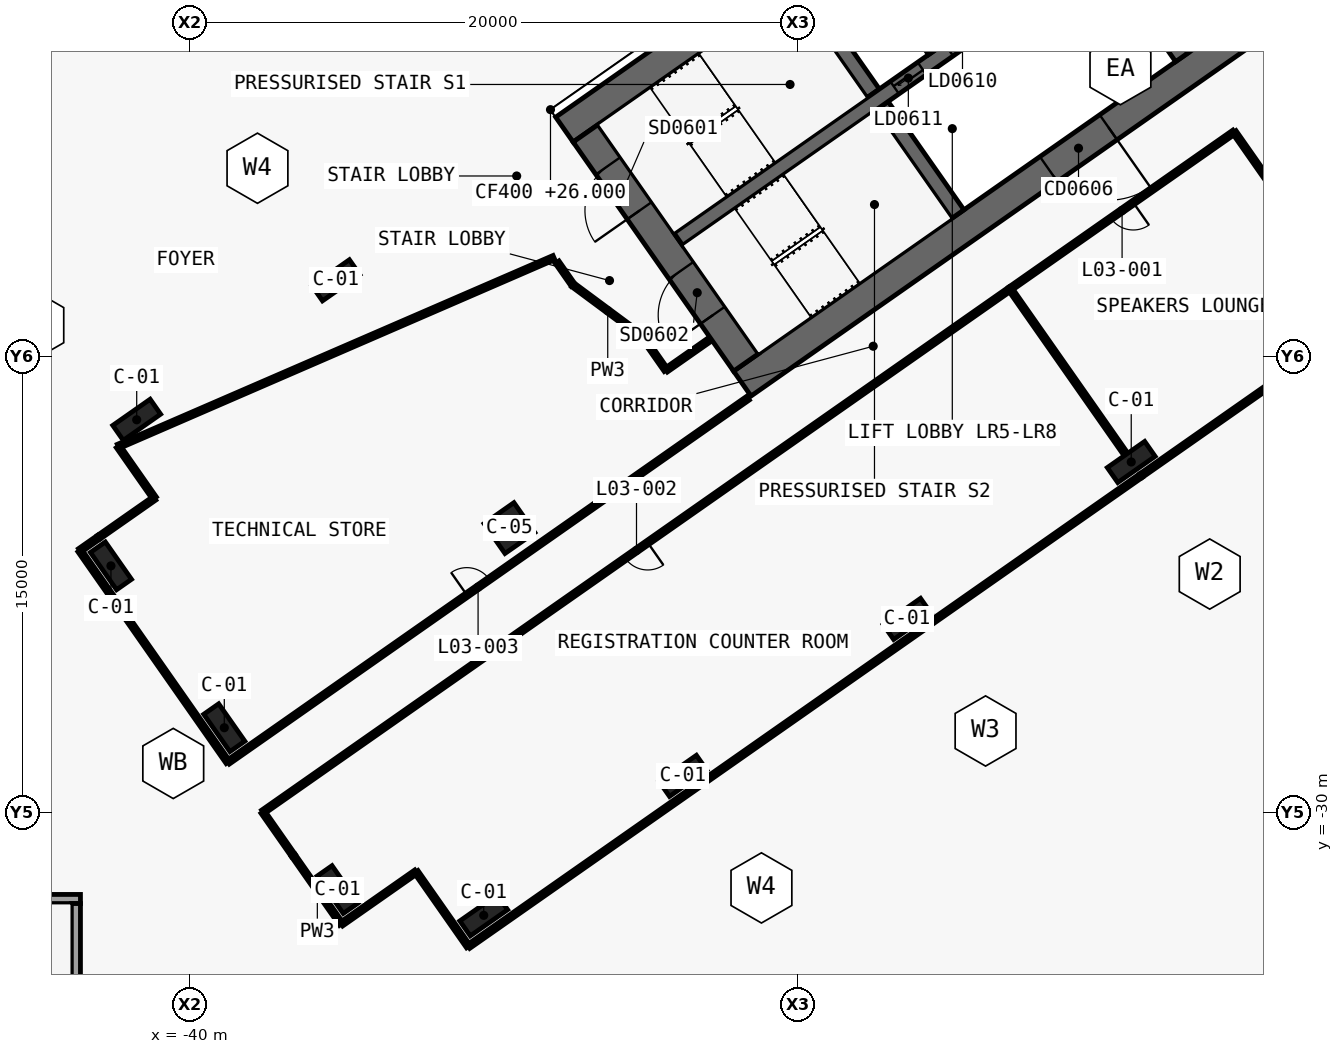
"""IFC4 building model, lengths in metres.
Left out: names, types, materials, properties, quantities, classifications, styles, units other than length and angle.
Written with IfcOpenShell. Run it as: python <this file> out.ifc"""

import sys

from ifc_helpers import new_model, si_unit, direction, frame, frame_2d, origin, origin_2d, place, context, subcontext, project, spatial, polyline, rectangle, outline, extrude, element, fill, save


model = new_model("IFC4")
c1 = context("Model", 3, precision=1e-05, world=origin(), true_north=direction((0.0, 1.0)))
c2 = subcontext(c1, "Body", "Model", "MODEL_VIEW")
j1 = project(units=[si_unit("LENGTHUNIT", "METRE"), si_unit("PLANEANGLEUNIT", "RADIAN")], contexts=[c1])
p1 = place(None, origin())
s1 = spatial("IfcSite", under=j1, at=p1, CompositionType="ELEMENT")
p2 = place(p1, origin())
s2 = spatial("IfcBuilding", under=s1, at=p2, CompositionType="ELEMENT")
p3 = place(p2, frame((0.0, 0.0, 26.0)))
s3 = spatial("IfcBuildingStorey", under=s2, at=p3, CompositionType="ELEMENT", Elevation=26.0)
p4 = place(p3, frame((0.037, 11.867, 0.0), z_axis=(0.0, 0.0, 1.0), x_axis=(-0.819155306259, -0.573571777746, 0.0)))
e1 = element("IfcWall", 1, at=p4, inside=s3, PredefinedType="SHEAR", context=c2, shape_type="SweptSolid", body=[
    extrude(outline(polyline([(33.837, 0.5), (0.7, 0.5), (0.0, -0.5), (33.837, -0.5), (33.837, 0.5)])), origin(), (0.0, 0.0, 1.0), 6.0),
])
p5 = place(p3, frame((0.037, -0.585, 0.0), z_axis=(0.0, 0.0, 1.0), x_axis=(-0.819157152511, -0.573569140985, 0.0)))
e2 = element("IfcWall", 2, at=p5, inside=s3, PredefinedType="SHEAR", context=c2, shape_type="SweptSolid", body=[
    extrude(outline(polyline([(26.695, 0.5), (0.7, 0.5), (0.0, -0.5), (26.695, -0.5), (26.695, 0.5)])), origin(), (0.0, 0.0, 1.0), 6.0),
])
p6 = place(p5, frame((2.995, 0.0, 0.0)))
e3 = element("IfcOpeningElement", 3, at=p6, cuts=e2, PredefinedType="OPENING", context=c2, shape_type="SweptSolid", body=[
    extrude(rectangle(XDim=2.4, YDim=2.1, at=frame_2d((1.2, 1.05))), frame((0.0, 0.51, 0.0), z_axis=(0.0, -1.0, 0.0), x_axis=(1.0, 0.0, 0.0)), (0.0, 0.0, 1.0), 1.02),
])
p7 = place(p5, frame((11.995, 0.0, 0.0)))
e4 = element("IfcOpeningElement", 4, at=p7, cuts=e2, PredefinedType="OPENING", context=c2, shape_type="SweptSolid", body=[
    extrude(rectangle(XDim=2.4, YDim=2.1, at=frame_2d((1.2, 1.05))), frame((0.0, 0.51, 0.0), z_axis=(0.0, -1.0, 0.0), x_axis=(1.0, 0.0, 0.0)), (0.0, 0.0, 1.0), 1.02),
])
p8 = place(p3, frame((-21.708, -15.2, 0.0), z_axis=(0.0, 0.0, 1.0), x_axis=(-0.573576324356, 0.819152122709, 0.0)))
e5 = element("IfcWall", 5, at=p8, inside=s3, PredefinedType="SHEAR", context=c2, shape_type="SweptSolid", body=[
    extrude(outline(polyline([(0.0, 0.5), (0.0, -0.5), (9.2, -0.5), (9.2, 0.5), (0.0, 0.5)])), origin(), (0.0, 0.0, 1.0), 6.0),
])
p9 = place(p8, frame((6.1, 0.0, 0.0)))
e6 = element("IfcOpeningElement", 6, at=p9, cuts=e5, PredefinedType="OPENING", context=c2, shape_type="SweptSolid", body=[
    extrude(rectangle(XDim=1.8, YDim=2.1, at=frame_2d((0.9, 1.05))), frame((0.0, 0.51, 0.0), z_axis=(0.0, -1.0, 0.0), x_axis=(1.0, 0.0, 0.0)), (0.0, 0.0, 1.0), 1.02),
])
p10 = place(p8, frame((1.9, 0.0, 0.0)))
e7 = element("IfcOpeningElement", 7, at=p10, cuts=e5, PredefinedType="OPENING", context=c2, shape_type="SweptSolid", body=[
    extrude(rectangle(XDim=1.8, YDim=2.1, at=frame_2d((0.9, 1.05))), frame((0.0, 0.51, 0.0), z_axis=(0.0, -1.0, 0.0), x_axis=(1.0, 0.0, 0.0)), (0.0, 0.0, 1.0), 1.02),
])
p11 = place(p3, frame((-7.372, -5.162, 0.0), z_axis=(0.0, 0.0, 1.0), x_axis=(-0.573594173421, 0.819139624372, 0.0)))
e8 = element("IfcWall", 8, at=p11, inside=s3, PredefinedType="SHEAR", context=c2, shape_type="SweptSolid", body=[
    extrude(outline(polyline([(4.35, 0.25), (0.0, 0.25), (0.0, -0.25), (4.35, -0.25), (4.35, 0.25)])), origin(), (0.0, 0.0, 1.0), 6.0),
])
p12 = place(p3, frame((-14.745, -10.324, 0.0), z_axis=(0.0, 0.0, 1.0), x_axis=(-0.57356780395, 0.819158088694, 0.0)))
e9 = element("IfcWall", 9, at=p12, inside=s3, PredefinedType="SHEAR", context=c2, shape_type="SweptSolid", body=[
    extrude(outline(polyline([(4.35, 0.25), (0.0, 0.25), (0.0, -0.25), (4.35, -0.25), (4.35, 0.25)])), origin(), (0.0, 0.0, 1.0), 6.0),
])
p13 = place(p3, frame((-17.527, -6.352, 0.0), z_axis=(0.0, 0.0, 1.0), x_axis=(-0.573530143085, 0.819184457233, 0.0)))
e10 = element("IfcWall", 10, at=p13, inside=s3, PredefinedType="SHEAR", context=c2, shape_type="SweptSolid", body=[
    extrude(outline(polyline([(4.35, -0.25), (4.35, 0.25), (0.0, 0.25), (0.0, -0.25), (4.35, -0.25)])), origin(), (0.0, 0.0, 1.0), 6.0),
])
p14 = place(p3, frame((-2.638, 3.768, 0.0), z_axis=(0.0, 0.0, 1.0), x_axis=(-0.819148977158, -0.573580816643, 0.0)))
e11 = element("IfcWall", 11, at=p14, inside=s3, PredefinedType="SHEAR", context=c2, shape_type="SweptSolid", body=[
    extrude(outline(polyline([(26.0, 0.25), (0.0, 0.25), (0.0, -0.25), (26.0, -0.25), (26.0, 0.25)])), origin(), (0.0, 0.0, 1.0), 6.0),
])
p15 = place(p14, frame((1.169, 0.0, 0.0)))
e12 = element("IfcOpeningElement", 12, at=p15, cuts=e11, PredefinedType="OPENING", context=c2, shape_type="SweptSolid", body=[
    extrude(rectangle(XDim=1.1, YDim=2.1, at=frame_2d((0.55, 1.05))), frame((0.0, 0.26, 0.0), z_axis=(0.0, -1.0, 0.0), x_axis=(1.0, 0.0, 0.0)), (0.0, 0.0, 1.0), 0.52),
])
p16 = place(p14, frame((3.206, 0.0, 0.0)))
e13 = element("IfcOpeningElement", 13, at=p16, cuts=e11, PredefinedType="OPENING", context=c2, shape_type="SweptSolid", body=[
    extrude(rectangle(XDim=1.1, YDim=2.1, at=frame_2d((0.55, 1.05))), frame((0.0, 0.26, 0.0), z_axis=(0.0, -1.0, 0.0), x_axis=(1.0, 0.0, 0.0)), (0.0, 0.0, 1.0), 0.52),
])
p17 = place(p14, frame((5.244, 0.0, 0.0)))
e14 = element("IfcOpeningElement", 14, at=p17, cuts=e11, PredefinedType="OPENING", context=c2, shape_type="SweptSolid", body=[
    extrude(rectangle(XDim=1.1, YDim=2.1, at=frame_2d((0.55, 1.05))), frame((0.0, 0.26, 0.0), z_axis=(0.0, -1.0, 0.0), x_axis=(1.0, 0.0, 0.0)), (0.0, 0.0, 1.0), 0.52),
])
p18 = place(p14, frame((7.281, 0.0, 0.0)))
e15 = element("IfcOpeningElement", 15, at=p18, cuts=e11, PredefinedType="OPENING", context=c2, shape_type="SweptSolid", body=[
    extrude(rectangle(XDim=1.1, YDim=2.1, at=frame_2d((0.55, 1.05))), frame((0.0, 0.26, 0.0), z_axis=(0.0, -1.0, 0.0), x_axis=(1.0, 0.0, 0.0)), (0.0, 0.0, 1.0), 0.52),
])
p19 = place(p14, frame((9.688, 0.0, 0.0)))
e16 = element("IfcOpeningElement", 16, at=p19, cuts=e11, PredefinedType="OPENING", context=c2, shape_type="SweptSolid", body=[
    extrude(rectangle(XDim=1.1, YDim=2.1, at=frame_2d((0.55, 1.05))), frame((0.0, 0.26, 0.0), z_axis=(0.0, -1.0, 0.0), x_axis=(1.0, 0.0, 0.0)), (0.0, 0.0, 1.0), 0.52),
])
p20 = place(p14, frame((11.863, 0.0, 0.0)))
e17 = element("IfcOpeningElement", 17, at=p20, cuts=e11, PredefinedType="OPENING", context=c2, shape_type="SweptSolid", body=[
    extrude(rectangle(XDim=1.1, YDim=2.1, at=frame_2d((0.55, 1.05))), frame((0.0, 0.26, 0.0), z_axis=(0.0, -1.0, 0.0), x_axis=(1.0, 0.0, 0.0)), (0.0, 0.0, 1.0), 0.52),
])
p21 = place(p14, frame((14.038, 0.0, 0.0)))
e18 = element("IfcOpeningElement", 18, at=p21, cuts=e11, PredefinedType="OPENING", context=c2, shape_type="SweptSolid", body=[
    extrude(rectangle(XDim=1.1, YDim=2.1, at=frame_2d((0.55, 1.05))), frame((0.0, 0.26, 0.0), z_axis=(0.0, -1.0, 0.0), x_axis=(1.0, 0.0, 0.0)), (0.0, 0.0, 1.0), 0.52),
])
p22 = place(p14, frame((16.212, 0.0, 0.0)))
e19 = element("IfcOpeningElement", 19, at=p22, cuts=e11, PredefinedType="OPENING", context=c2, shape_type="SweptSolid", body=[
    extrude(rectangle(XDim=1.1, YDim=2.1, at=frame_2d((0.55, 1.05))), frame((0.0, 0.26, 0.0), z_axis=(0.0, -1.0, 0.0), x_axis=(1.0, 0.0, 0.0)), (0.0, 0.0, 1.0), 0.52),
])
p23 = place(p3, frame((-49.4, -32.85, 0.0), z_axis=(0.0, 0.0, 1.0), x_axis=(1.0, 0.0, 0.0)))
e20 = element("IfcWall", 20, at=p23, inside=s3, PredefinedType="SOLIDWALL", context=c2, shape_type="SweptSolid", body=[
    extrude(rectangle(XDim=5.8, YDim=0.3, at=frame_2d((2.9, 0.0))), origin(), (0.0, 0.0, 1.0), 6.0),
])
p24 = place(p3, frame((-43.75, -43.0, 0.0), z_axis=(0.0, 0.0, 1.0), x_axis=(0.0, 1.0, 0.0)))
e21 = element("IfcWall", 21, at=p24, inside=s3, PredefinedType="SOLIDWALL", context=c2, shape_type="SweptSolid", body=[
    extrude(rectangle(XDim=10.0, YDim=0.3, at=frame_2d((5.0, 0.0))), origin(), (0.0, 0.0, 1.0), 6.0),
])
p25 = place(p24, frame((0.212, 0.0, 0.0)))
e22 = element("IfcOpeningElement", 22, at=p25, cuts=e21, PredefinedType="OPENING", context=c2, shape_type="SweptSolid", body=[
    extrude(rectangle(XDim=2.1, YDim=2.1, at=frame_2d((1.05, 1.05))), frame((0.0, 0.16, 0.0), z_axis=(0.0, -1.0, 0.0), x_axis=(1.0, 0.0, 0.0)), (0.0, 0.0, 1.0), 0.32),
])
for number, where, z_axis, x_axis in (
    (23, (-9.038, -18.475, 0.0), (0.0, 0.0, 1.0), (-0.819, -0.574, 0.0)),
    (24, (-16.41, -23.637, 0.0), (0.0, 0.0, 1.0), (-0.819, -0.574, 0.0)),
    (25, (-23.782, -28.799, 0.0), (0.0, 0.0, 1.0), (-0.819, -0.574, 0.0)),
    (26, (-30.336, -33.388, 0.0), (0.0, 0.0, 1.0), (-0.819, -0.574, 0.0)),
    (27, (-35.197, -12.498, 0.0), (0.0, 0.0, 1.0), (-0.819, -0.574, 0.0)),
    (28, (-41.75, -17.087, 0.0), (0.0, 0.0, 1.0), (-0.819, -0.574, 0.0)),
    (29, (-35.14, -32.541, 0.0), (0.0, 0.0, 1.0), (-0.574, 0.819, 0.0)),
    (30, (-38.869, -27.216, 0.0), (0.0, 0.0, 1.0), (-0.574, 0.819, 0.0)),
    (31, (-42.597, -21.892, 0.0), (0.0, 0.0, 1.0), (-0.574, 0.819, 0.0)),
):
    element("IfcColumn", number, at=place(p3, frame(where, z_axis=z_axis, x_axis=x_axis)), inside=s3, PredefinedType="COLUMN", context=c2, shape_type="SweptSolid", body=[
        extrude(rectangle(XDim=1.5, YDim=0.6, at=origin_2d()), origin(), (0.0, 0.0, 1.0), 6.0),
    ])
p26 = place(p3, frame((-29.49, -20.649, 0.0), z_axis=(0.0, 0.0, 1.0), x_axis=(-0.819152044289, -0.573576436351, 0.0)))
e32 = element("IfcColumn", 32, at=p26, inside=s3, PredefinedType="COLUMN", context=c2, shape_type="SweptSolid", body=[
    extrude(rectangle(XDim=1.2, YDim=1.2, at=origin_2d()), origin(), (0.0, 0.0, 1.0), 6.0),
])
p27 = place(p3, frame((-15.622, -5.018, 0.0), z_axis=(0.0, 0.0, 1.0), x_axis=(-0.573594173421, 0.819139624372, 0.0)))
e33 = element("IfcWall", 33, at=p27, inside=s3, PredefinedType="SOLIDWALL", context=c2, shape_type="SweptSolid", body=[
    extrude(rectangle(XDim=4.35, YDim=0.2, at=frame_2d((2.175, 0.0))), origin(), (0.0, 0.0, 1.0), 6.0),
])
p28 = place(p3, frame((-38.746, -28.351, 0.0), z_axis=(0.0, 0.0, 1.0), x_axis=(0.819148965066, 0.573580833911, 0.0)))
e34 = element("IfcWall", 34, at=p28, inside=s3, PredefinedType="PARTITIONING", context=c2, shape_type="SweptSolid", body=[
    extrude(rectangle(XDim=20.88, YDim=0.15, at=frame_2d((10.44, 0.0))), origin(), (0.0, 0.0, 1.0), 4.18),
])
p29 = place(p28, frame((9.59, 0.0, 0.0)))
e35 = element("IfcOpeningElement", 35, at=p29, cuts=e34, PredefinedType="OPENING", context=c2, shape_type="SweptSolid", body=[
    extrude(rectangle(XDim=0.9, YDim=2.1, at=frame_2d((0.45, 1.05))), frame((0.0, 0.085, 0.0), z_axis=(0.0, -1.0, 0.0), x_axis=(1.0, 0.0, 0.0)), (0.0, 0.0, 1.0), 0.17),
])
p30 = place(p3, frame((-5.652, -7.62, 0.0), z_axis=(0.0, 0.0, 1.0), x_axis=(-0.81915291695, -0.57357519006, 0.0)))
e36 = element("IfcWall", 36, at=p30, inside=s3, PredefinedType="PARTITIONING", context=c2, shape_type="SweptSolid", body=[
    extrude(rectangle(XDim=9.002, YDim=0.15, at=frame_2d((4.501, 0.0))), origin(), (0.0, 0.0, 1.0), 4.18),
])
p31 = place(p30, frame((4.051, 0.0, 0.0)))
e37 = element("IfcOpeningElement", 37, at=p31, cuts=e36, PredefinedType="OPENING", context=c2, shape_type="SweptSolid", body=[
    extrude(rectangle(XDim=0.9, YDim=2.1, at=frame_2d((0.45, 1.05))), frame((0.0, 0.085, 0.0), z_axis=(0.0, -1.0, 0.0), x_axis=(1.0, 0.0, 0.0)), (0.0, 0.0, 1.0), 0.17),
])
p32 = place(p3, frame((-13.022, -12.781, 0.0), z_axis=(0.0, 0.0, 1.0), x_axis=(-0.819154688631, -0.57357265982, 0.0)))
e38 = element("IfcWall", 38, at=p32, inside=s3, PredefinedType="PARTITIONING", context=c2, shape_type="SweptSolid", body=[
    extrude(rectangle(XDim=30.002, YDim=0.15, at=frame_2d((15.001, 0.0))), origin(), (0.0, 0.0, 1.0), 4.18),
])
p33 = place(p32, frame((14.551, 0.0, 0.0)))
e39 = element("IfcOpeningElement", 39, at=p33, cuts=e38, PredefinedType="OPENING", context=c2, shape_type="SweptSolid", body=[
    extrude(rectangle(XDim=0.9, YDim=2.1, at=frame_2d((0.45, 1.05))), frame((0.0, 0.085, 0.0), z_axis=(0.0, -1.0, 0.0), x_axis=(1.0, 0.0, 0.0)), (0.0, 0.0, 1.0), 0.17),
])
p34 = place(p3, frame((-8.723, -18.927, 0.0), z_axis=(0.0, 0.0, 1.0), x_axis=(0.81913387212, 0.573602388024, 0.0)))
e40 = element("IfcWall", 40, at=p34, inside=s3, PredefinedType="PARTITIONING", context=c2, shape_type="SweptSolid", body=[
    extrude(rectangle(XDim=6.552, YDim=0.15, at=frame_2d((3.276, 0.0))), origin(), (0.0, 0.0, 1.0), 5.6),
])
p35 = place(p3, frame((-35.017, -33.676, 0.0), z_axis=(0.0, 0.0, 1.0), x_axis=(0.81917072002, 0.573549763719, 0.0)))
e41 = element("IfcWall", 41, at=p35, inside=s3, PredefinedType="PARTITIONING", context=c2, shape_type="SweptSolid", body=[
    extrude(rectangle(XDim=2.999, YDim=0.15, at=frame_2d((1.5, 0.0))), origin(), (0.0, 0.0, 1.0), 4.38),
])
p36 = place(p3, frame((-32.56, -31.956, 0.0), z_axis=(0.0, 0.0, 1.0), x_axis=(0.573604390867, -0.819132469615, 0.0)))
e42 = element("IfcWall", 42, at=p36, inside=s3, PredefinedType="PARTITIONING", context=c2, shape_type="SweptSolid", body=[
    extrude(rectangle(XDim=2.999, YDim=0.15, at=frame_2d((1.5, 0.0))), origin(), (0.0, 0.0, 1.0), 4.38),
])
p37 = place(p3, frame((-30.839, -34.413, 0.0), z_axis=(0.0, 0.0, 1.0), x_axis=(0.819150779762, 0.573578242279, 0.0)))
e43 = element("IfcWall", 43, at=p37, inside=s3, PredefinedType="PARTITIONING", context=c2, shape_type="SweptSolid", body=[
    extrude(rectangle(XDim=27.002, YDim=0.15, at=frame_2d((13.501, 0.0))), origin(), (0.0, 0.0, 1.0), 4.58),
])
p38 = place(p3, frame((-36.599, -31.418, 0.0), z_axis=(0.0, 0.0, 1.0), x_axis=(0.57362881286, -0.819115367367, 0.0)))
e44 = element("IfcWall", 44, at=p38, inside=s3, PredefinedType="PARTITIONING", context=c2, shape_type="SweptSolid", body=[
    extrude(rectangle(XDim=2.756, YDim=0.15, at=frame_2d((1.378, 0.0))), origin(), (0.0, 0.0, 1.0), 5.6),
])
p39 = place(p3, frame((-42.359, -17.961, 0.0), z_axis=(0.0, 0.0, 1.0), x_axis=(0.573603984281, -0.819132754331, 0.0)))
e45 = element("IfcWall", 45, at=p39, inside=s3, PredefinedType="PARTITIONING", context=c2, shape_type="SweptSolid", body=[
    extrude(rectangle(XDim=2.082, YDim=0.15, at=frame_2d((1.041, 0.0))), origin(), (0.0, 0.0, 1.0), 4.38),
])
p40 = place(p3, frame((-41.165, -19.667, 0.0), z_axis=(0.0, 0.0, 1.0), x_axis=(-0.819149945048, -0.573579434366, 0.0)))
e46 = element("IfcWall", 46, at=p40, inside=s3, PredefinedType="PARTITIONING", context=c2, shape_type="SweptSolid", body=[
    extrude(rectangle(XDim=2.239, YDim=0.15, at=frame_2d((1.119, 0.0))), origin(), (0.0, 0.0, 1.0), 4.38),
])
p41 = place(p3, frame((-43.622, -21.387, 0.0), z_axis=(0.0, 0.0, 1.0), x_axis=(0.573487395822, -0.819214383928, 0.0)))
e47 = element("IfcWall", 47, at=p41, inside=s3, PredefinedType="PARTITIONING", context=c2, shape_type="SweptSolid", body=[
    extrude(rectangle(XDim=8.503, YDim=0.15, at=frame_2d((4.251, 0.0))), origin(), (0.0, 0.0, 1.0), 5.6),
])
p42 = place(p3, frame((-43.0, -20.952, 0.0), z_axis=(0.0, 0.0, 1.0), x_axis=(-0.819216809636, -0.573483930734, 0.0)))
e48 = element("IfcWall", 48, at=p42, inside=s3, PredefinedType="PARTITIONING", context=c2, shape_type="SweptSolid", body=[
    extrude(rectangle(XDim=0.759, YDim=0.15, at=frame_2d((0.379, 0.0))), origin(), (0.0, 0.0, 1.0), 5.6),
])
p43 = place(p3, frame((-37.6, -29.988, 0.0), z_axis=(0.0, 0.0, 1.0), x_axis=(0.573518712821, -0.819192459709, 0.0)))
e49 = element("IfcWall", 49, at=p43, inside=s3, PredefinedType="PARTITIONING", context=c2, shape_type="SweptSolid", body=[
    extrude(rectangle(XDim=1.744, YDim=0.15, at=frame_2d((0.872, 0.0))), origin(), (0.0, 0.0, 1.0), 5.6),
])
p44 = place(p3, frame((-1.849, -13.051, 0.0), z_axis=(0.0, 0.0, 1.0), x_axis=(-0.573575988258, 0.819152358047, 0.0)))
e50 = element("IfcWall", 50, at=p44, inside=s3, PredefinedType="PARTITIONING", context=c2, shape_type="SweptSolid", body=[
    extrude(rectangle(XDim=6.632, YDim=0.15, at=frame_2d((3.316, 0.0))), origin(), (0.0, 0.0, 1.0), 4.18),
])
p45 = place(p3, frame((-28.026, -11.751, 0.0), z_axis=(0.0, 0.0, 1.0), x_axis=(-0.91753357696, -0.397658314577, 0.0)))
e51 = element("IfcWall", 51, at=p45, inside=s3, PredefinedType="PARTITIONING", context=c2, shape_type="SweptSolid", body=[
    extrude(rectangle(XDim=15.621, YDim=0.15, at=frame_2d((7.811, 0.0))), origin(), (0.0, 0.0, 1.0), 4.18),
])
p46 = place(p3, frame((-22.961, -14.49, 0.0), z_axis=(0.0, 0.0, 1.0), x_axis=(-0.819109000826, -0.573637903879, 0.0)))
e52 = element("IfcWall", 52, at=p46, inside=s3, PredefinedType="PARTITIONING", context=c2, shape_type="SweptSolid", body=[
    extrude(rectangle(XDim=1.68, YDim=0.15, at=frame_2d((0.84, 0.0))), origin(), (0.0, 0.0, 1.0), 5.6),
])
p47 = place(p3, frame((-24.337, -15.454, 0.0), z_axis=(0.0, 0.0, 1.0), x_axis=(-0.573571252353, 0.819155674139, 0.0)))
e53 = element("IfcWall", 53, at=p47, inside=s3, PredefinedType="PARTITIONING", context=c2, shape_type="SweptSolid", body=[
    extrude(rectangle(XDim=1.354, YDim=0.15, at=frame_2d((0.677, 0.0))), origin(), (0.0, 0.0, 1.0), 5.6),
])
p48 = place(p3, frame((-25.114, -14.345, 0.0), z_axis=(0.0, 0.0, 1.0), x_axis=(-0.803169525988, 0.59575054555, 0.0)))
e54 = element("IfcWall", 54, at=p48, inside=s3, PredefinedType="PARTITIONING", context=c2, shape_type="SweptSolid", body=[
    extrude(rectangle(XDim=2.846, YDim=0.15, at=frame_2d((1.423, 0.0))), origin(), (0.0, 0.0, 1.0), 5.6),
])
p49 = place(p3, frame((-27.4, -12.649, 0.0), z_axis=(0.0, 0.0, 1.0), x_axis=(-0.573713979357, 0.819055718428, 0.0)))
e55 = element("IfcWall", 55, at=p49, inside=s3, PredefinedType="PARTITIONING", context=c2, shape_type="SweptSolid", body=[
    extrude(rectangle(XDim=0.912, YDim=0.15, at=frame_2d((0.456, 0.0))), origin(), (0.0, 0.0, 1.0), 5.6),
])
p50 = place(p3, frame((-9.221, -18.213, 0.0), z_axis=(0.0, 0.0, 1.0), x_axis=(-0.573556251799, 0.819166177294, 0.0)))
e56 = element("IfcWall", 56, at=p50, inside=s3, PredefinedType="PARTITIONING", context=c2, shape_type="SweptSolid", body=[
    extrude(rectangle(XDim=6.63, YDim=0.15, at=frame_2d((3.315, 0.0))), origin(), (0.0, 0.0, 1.0), 4.18),
])
p51 = place(p22, origin())
e57 = element("IfcDoor", 57, at=p51, inside=s3, OperationType="SLIDING_TO_RIGHT", PredefinedType="DOOR", context=c2, shape_type="SweptSolid", body=[
    extrude(rectangle(XDim=1.1, YDim=2.1, at=frame_2d((0.55, 1.05))), frame((0.0, 0.025, 0.0), z_axis=(0.0, -1.0, 0.0), x_axis=(1.0, 0.0, 0.0)), (0.0, 0.0, 1.0), 0.05),
])
fill(e19, e57)
p52 = place(p7, origin())
e58 = element("IfcDoor", 58, at=p52, inside=s3, OperationType="DOUBLE_DOOR_SINGLE_SWING", PredefinedType="DOOR", context=c2, shape_type="SweptSolid", body=[
    extrude(rectangle(XDim=2.4, YDim=2.1, at=frame_2d((1.2, 1.05))), frame((0.0, 0.025, 0.0), z_axis=(0.0, -1.0, 0.0), x_axis=(1.0, 0.0, 0.0)), (0.0, 0.0, 1.0), 0.05),
])
fill(e4, e58)
p53 = place(p9, origin())
e59 = element("IfcDoor", 59, at=p53, inside=s3, OperationType="DOUBLE_DOOR_SINGLE_SWING", PredefinedType="DOOR", context=c2, shape_type="SweptSolid", body=[
    extrude(rectangle(XDim=1.8, YDim=2.1, at=frame_2d((0.9, 1.05))), frame((0.0, 0.025, 0.0), z_axis=(0.0, -1.0, 0.0), x_axis=(1.0, 0.0, 0.0)), (0.0, 0.0, 1.0), 0.05),
])
fill(e6, e59)
p54 = place(p10, origin())
e60 = element("IfcDoor", 60, at=p54, inside=s3, OperationType="DOUBLE_DOOR_SINGLE_SWING", PredefinedType="DOOR", context=c2, shape_type="SweptSolid", body=[
    extrude(rectangle(XDim=1.8, YDim=2.1, at=frame_2d((0.9, 1.05))), frame((0.0, 0.025, 0.0), z_axis=(0.0, -1.0, 0.0), x_axis=(1.0, 0.0, 0.0)), (0.0, 0.0, 1.0), 0.05),
])
fill(e7, e60)
p55 = place(p31, origin())
e61 = element("IfcDoor", 61, at=p55, inside=s3, OperationType="SINGLE_SWING_RIGHT", PredefinedType="DOOR", context=c2, shape_type="SweptSolid", body=[
    extrude(rectangle(XDim=0.9, YDim=2.1, at=frame_2d((0.45, 1.05))), frame((0.0, 0.025, 0.0), z_axis=(0.0, -1.0, 0.0), x_axis=(1.0, 0.0, 0.0)), (0.0, 0.0, 1.0), 0.05),
])
fill(e37, e61)
p56 = place(p33, origin())
e62 = element("IfcDoor", 62, at=p56, inside=s3, OperationType="SINGLE_SWING_RIGHT", PredefinedType="DOOR", context=c2, shape_type="SweptSolid", body=[
    extrude(rectangle(XDim=0.9, YDim=2.1, at=frame_2d((0.45, 1.05))), frame((0.0, 0.025, 0.0), z_axis=(0.0, -1.0, 0.0), x_axis=(1.0, 0.0, 0.0)), (0.0, 0.0, 1.0), 0.05),
])
fill(e39, e62)
p57 = place(p29, origin())
e63 = element("IfcDoor", 63, at=p57, inside=s3, OperationType="SINGLE_SWING_LEFT", PredefinedType="DOOR", context=c2, shape_type="SweptSolid", body=[
    extrude(rectangle(XDim=0.9, YDim=2.1, at=frame_2d((0.45, 1.05))), frame((0.0, 0.025, 0.0), z_axis=(0.0, -1.0, 0.0), x_axis=(1.0, 0.0, 0.0)), (0.0, 0.0, 1.0), 0.05),
])
fill(e35, e63)
save(model, sys.argv[1])
